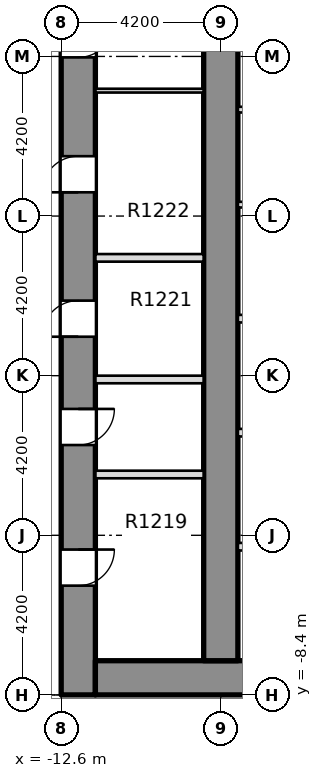
"""IFC4 building model, lengths in metres.
Left out: names, types, materials, properties, quantities, classifications, styles, units other than length and angle.
Written with IfcOpenShell. Run it as: python <this file> out.ifc"""

import sys

from ifc_helpers import new_model, si_unit, direction, frame, frame_2d, origin, place, context, subcontext, project, spatial, rectangle, extrude, element, fill, save


model = new_model("IFC4")
c1 = context("Model", 3, precision=1e-05, world=origin(), true_north=direction((0.0, 1.0)))
c2 = subcontext(c1, "Body", "Model", "MODEL_VIEW")
j1 = project(units=[si_unit("LENGTHUNIT", "METRE"), si_unit("PLANEANGLEUNIT", "RADIAN")], contexts=[c1])
p1 = place(None, origin())
s1 = spatial("IfcSite", under=j1, at=p1, CompositionType="ELEMENT")
p2 = place(p1, origin())
s2 = spatial("IfcBuilding", under=s1, at=p2, CompositionType="ELEMENT")
p3 = place(p2, frame((0.0, 0.0, 55.2)))
s3 = spatial("IfcBuildingStorey", under=s2, at=p3, CompositionType="ELEMENT", Elevation=55.2)
p4 = place(p3, frame((-12.15, -8.4, -0.32), z_axis=(0.0, 0.0, 1.0), x_axis=(0.0, 1.0, 0.0)))
e1 = element("IfcWall", 1, at=p4, inside=s3, PredefinedType="SHEAR", context=c2, shape_type="SweptSolid", body=[
    extrude(rectangle(XDim=30.15, YDim=0.9, at=frame_2d((15.075, 0.0))), origin(), (0.0, 0.0, 1.0), 3.45),
])
p5 = place(p4, frame((2.875, 0.0, 0.32)))
e2 = element("IfcOpeningElement", 2, at=p5, cuts=e1, PredefinedType="OPENING", context=c2, shape_type="SweptSolid", body=[
    extrude(rectangle(XDim=0.95, YDim=2.1, at=frame_2d((0.475, 1.05))), frame((0.0, 0.46, 0.0), z_axis=(0.0, -1.0, 0.0), x_axis=(1.0, 0.0, 0.0)), (0.0, 0.0, 1.0), 0.92),
])
p6 = place(p4, frame((6.575, 0.0, 0.32)))
e3 = element("IfcOpeningElement", 3, at=p6, cuts=e1, PredefinedType="OPENING", context=c2, shape_type="SweptSolid", body=[
    extrude(rectangle(XDim=0.95, YDim=2.1, at=frame_2d((0.475, 1.05))), frame((0.0, 0.46, 0.0), z_axis=(0.0, -1.0, 0.0), x_axis=(1.0, 0.0, 0.0)), (0.0, 0.0, 1.0), 0.92),
])
p7 = place(p4, frame((9.425, 0.0, 0.32)))
e4 = element("IfcOpeningElement", 4, at=p7, cuts=e1, PredefinedType="OPENING", context=c2, shape_type="SweptSolid", body=[
    extrude(rectangle(XDim=0.95, YDim=2.1, at=frame_2d((0.475, 1.05))), frame((0.0, 0.46, 0.0), z_axis=(0.0, -1.0, 0.0), x_axis=(1.0, 0.0, 0.0)), (0.0, 0.0, 1.0), 0.92),
])
p8 = place(p4, frame((13.225, 0.0, 0.32)))
e5 = element("IfcOpeningElement", 5, at=p8, cuts=e1, PredefinedType="OPENING", context=c2, shape_type="SweptSolid", body=[
    extrude(rectangle(XDim=0.95, YDim=2.1, at=frame_2d((0.475, 1.05))), frame((0.0, 0.46, 0.0), z_axis=(0.0, -1.0, 0.0), x_axis=(1.0, 0.0, 0.0)), (0.0, 0.0, 1.0), 0.92),
])
p9 = place(p4, frame((16.775, 0.0, 0.32)))
e6 = element("IfcOpeningElement", 6, at=p9, cuts=e1, PredefinedType="OPENING", context=c2, shape_type="SweptSolid", body=[
    extrude(rectangle(XDim=0.95, YDim=2.1, at=frame_2d((0.475, 1.05))), frame((0.0, 0.46, 0.0), z_axis=(0.0, -1.0, 0.0), x_axis=(1.0, 0.0, 0.0)), (0.0, 0.0, 1.0), 0.92),
])
p10 = place(p4, frame((24.75, 0.0, 0.32)))
e7 = element("IfcOpeningElement", 7, at=p10, cuts=e1, PredefinedType="OPENING", context=c2, shape_type="SweptSolid", body=[
    extrude(rectangle(XDim=0.95, YDim=2.1, at=frame_2d((0.475, 1.05))), frame((0.0, 0.46, 0.0), z_axis=(0.0, -1.0, 0.0), x_axis=(1.0, 0.0, 0.0)), (0.0, 0.0, 1.0), 0.92),
])
p11 = place(p4, frame((19.3, 0.0, 0.32)))
e8 = element("IfcOpeningElement", 8, at=p11, cuts=e1, PredefinedType="OPENING", context=c2, shape_type="SweptSolid", body=[
    extrude(rectangle(XDim=1.2, YDim=2.1, at=frame_2d((0.6, 1.05))), frame((0.0, 0.46, 0.0), z_axis=(0.0, -1.0, 0.0), x_axis=(1.0, 0.0, 0.0)), (0.0, 0.0, 1.0), 0.92),
])
p12 = place(p3, frame((-11.7, -7.95, -0.32), z_axis=(0.0, 0.0, 1.0), x_axis=(1.0, 0.0, 0.0)))
e9 = element("IfcWall", 9, at=p12, inside=s3, PredefinedType="SHEAR", context=c2, shape_type="SweptSolid", body=[
    extrude(rectangle(XDim=23.4, YDim=0.9, at=frame_2d((11.7, 0.0))), origin(), (0.0, 0.0, 1.0), 3.45),
])
p13 = place(p12, frame((6.95, 0.0, 0.32)))
e10 = element("IfcOpeningElement", 10, at=p13, cuts=e9, PredefinedType="OPENING", context=c2, shape_type="SweptSolid", body=[
    extrude(rectangle(XDim=1.8, YDim=2.1, at=frame_2d((0.9, 1.05))), frame((0.0, 0.46, 0.0), z_axis=(0.0, -1.0, 0.0), x_axis=(1.0, 0.0, 0.0)), (0.0, 0.0, 1.0), 0.92),
])
p14 = place(p12, frame((14.65, 0.0, 0.32)))
e11 = element("IfcOpeningElement", 11, at=p14, cuts=e9, PredefinedType="OPENING", context=c2, shape_type="SweptSolid", body=[
    extrude(rectangle(XDim=1.8, YDim=2.1, at=frame_2d((0.9, 1.05))), frame((0.0, 0.46, 0.0), z_axis=(0.0, -1.0, 0.0), x_axis=(1.0, 0.0, 0.0)), (0.0, 0.0, 1.0), 0.92),
])
p15 = place(p3, frame((-8.4, -7.5, -0.32), z_axis=(0.0, 0.0, 1.0), x_axis=(0.0, 1.0, 0.0)))
e12 = element("IfcWall", 12, at=p15, inside=s3, PredefinedType="SHEAR", context=c2, shape_type="SweptSolid", body=[
    extrude(rectangle(XDim=28.35, YDim=0.9, at=frame_2d((14.175, 0.0))), origin(), (0.0, 0.0, 1.0), 3.45),
])
p16 = place(p15, frame((18.4, 0.0, 0.32)))
e13 = element("IfcOpeningElement", 13, at=p16, cuts=e12, PredefinedType="OPENING", context=c2, shape_type="SweptSolid", body=[
    extrude(rectangle(XDim=1.2, YDim=2.1, at=frame_2d((0.6, 1.05))), frame((0.0, 0.46, 0.0), z_axis=(0.0, -1.0, 0.0), x_axis=(1.0, 0.0, 0.0)), (0.0, 0.0, 1.0), 0.92),
])
for number, where, z_axis, x_axis in (
    (14, (-7.949, -4.5, 0.0), (0.0, 0.0, 1.0), (1.0, 0.0, 0.0)),
    (15, (-7.949, -1.5, 0.0), (0.0, 0.0, 1.0), (1.0, 0.0, 0.0)),
    (16, (-7.949, 1.5, 0.0), (0.0, 0.0, 1.0), (1.0, 0.0, 0.0)),
):
    element("IfcWall", number, at=place(p3, frame(where, z_axis=z_axis, x_axis=x_axis)), inside=s3, PredefinedType="PARTITIONING", context=c2, shape_type="SweptSolid", body=[
        extrude(rectangle(XDim=2.374, YDim=0.2, at=frame_2d((1.187, 0.0))), origin(), (0.0, 0.0, 1.0), 3.13),
    ])
p17 = place(p3, frame((-7.949, 4.5, 0.0), z_axis=(0.0, 0.0, 1.0), x_axis=(1.0, 0.0, 0.0)))
e17 = element("IfcWall", 17, at=p17, inside=s3, PredefinedType="PARTITIONING", context=c2, shape_type="SweptSolid", body=[
    extrude(rectangle(XDim=2.524, YDim=0.15, at=frame_2d((1.262, 0.0))), origin(), (0.0, 0.0, 1.0), 3.13),
])
p18 = place(p3, frame((-7.949, 7.0, 0.0), z_axis=(0.0, 0.0, 1.0), x_axis=(1.0, 0.0, 0.0)))
e18 = element("IfcWall", 18, at=p18, inside=s3, PredefinedType="PARTITIONING", context=c2, shape_type="SweptSolid", body=[
    extrude(rectangle(XDim=15.898, YDim=0.15, at=frame_2d((7.949, 0.0))), origin(), (0.0, 0.0, 1.0), 3.13),
])
p19 = place(p18, frame((7.249, 0.0, 0.0)))
e19 = element("IfcOpeningElement", 19, at=p19, cuts=e18, PredefinedType="OPENING", context=c2, shape_type="SweptSolid", body=[
    extrude(rectangle(XDim=1.4, YDim=2.1, at=frame_2d((0.7, 1.05))), frame((0.0, 0.085, 0.0), z_axis=(0.0, -1.0, 0.0), x_axis=(1.0, 0.0, 0.0)), (0.0, 0.0, 1.0), 0.17),
])
for number, where, z_axis, x_axis in (
    (20, (-11.699, -2.6, 0.0), (0.0, 0.0, 1.0), (1.0, 0.0, 0.0)),
    (21, (-11.699, -0.1, 0.0), (0.0, 0.0, 1.0), (1.0, 0.0, 0.0)),
    (22, (-11.699, 3.1, 0.0), (0.0, 0.0, 1.0), (1.0, 0.0, 0.0)),
):
    element("IfcWall", number, at=place(p3, frame(where, z_axis=z_axis, x_axis=x_axis)), inside=s3, PredefinedType="PARTITIONING", context=c2, shape_type="SweptSolid", body=[
        extrude(rectangle(XDim=2.848, YDim=0.2, at=frame_2d((1.424, 0.0))), origin(), (0.0, 0.0, 1.0), 3.13),
    ])
p20 = place(p3, frame((-11.699, 7.5, 0.0), z_axis=(0.0, 0.0, 1.0), x_axis=(1.0, 0.0, 0.0)))
e23 = element("IfcWall", 23, at=p20, inside=s3, PredefinedType="PARTITIONING", context=c2, shape_type="SweptSolid", body=[
    extrude(rectangle(XDim=2.848, YDim=0.1, at=frame_2d((1.424, 0.0))), origin(), (0.0, 0.0, 1.0), 3.13),
])
p21 = place(p5, origin())
e24 = element("IfcDoor", 24, at=p21, inside=s3, OperationType="SINGLE_SWING_LEFT", PredefinedType="DOOR", context=c2, shape_type="SweptSolid", body=[
    extrude(rectangle(XDim=0.95, YDim=2.1, at=frame_2d((0.475, 1.05))), frame((0.0, 0.025, 0.0), z_axis=(0.0, -1.0, 0.0), x_axis=(1.0, 0.0, 0.0)), (0.0, 0.0, 1.0), 0.05),
])
fill(e2, e24)
p22 = place(p6, origin())
e25 = element("IfcDoor", 25, at=p22, inside=s3, OperationType="SINGLE_SWING_LEFT", PredefinedType="DOOR", context=c2, shape_type="SweptSolid", body=[
    extrude(rectangle(XDim=0.95, YDim=2.1, at=frame_2d((0.475, 1.05))), frame((0.0, 0.025, 0.0), z_axis=(0.0, -1.0, 0.0), x_axis=(1.0, 0.0, 0.0)), (0.0, 0.0, 1.0), 0.05),
])
fill(e3, e25)
p23 = place(p7, origin())
e26 = element("IfcDoor", 26, at=p23, inside=s3, OperationType="SINGLE_SWING_LEFT", PredefinedType="DOOR", context=c2, shape_type="SweptSolid", body=[
    extrude(rectangle(XDim=0.95, YDim=2.1, at=frame_2d((0.475, 1.05))), frame((0.0, 0.025, 0.0), z_axis=(0.0, -1.0, 0.0), x_axis=(1.0, 0.0, 0.0)), (0.0, 0.0, 1.0), 0.05),
])
fill(e4, e26)
p24 = place(p8, origin())
e27 = element("IfcDoor", 27, at=p24, inside=s3, OperationType="SINGLE_SWING_LEFT", PredefinedType="DOOR", context=c2, shape_type="SweptSolid", body=[
    extrude(rectangle(XDim=0.95, YDim=2.1, at=frame_2d((0.475, 1.05))), frame((0.0, 0.025, 0.0), z_axis=(0.0, -1.0, 0.0), x_axis=(1.0, 0.0, 0.0)), (0.0, 0.0, 1.0), 0.05),
])
fill(e5, e27)
p25 = place(p9, origin())
e28 = element("IfcDoor", 28, at=p25, inside=s3, OperationType="SINGLE_SWING_LEFT", PredefinedType="DOOR", context=c2, shape_type="SweptSolid", body=[
    extrude(rectangle(XDim=0.95, YDim=2.1, at=frame_2d((0.475, 1.05))), frame((0.0, 0.025, 0.0), z_axis=(0.0, -1.0, 0.0), x_axis=(1.0, 0.0, 0.0)), (0.0, 0.0, 1.0), 0.05),
])
fill(e6, e28)
save(model, sys.argv[1])
